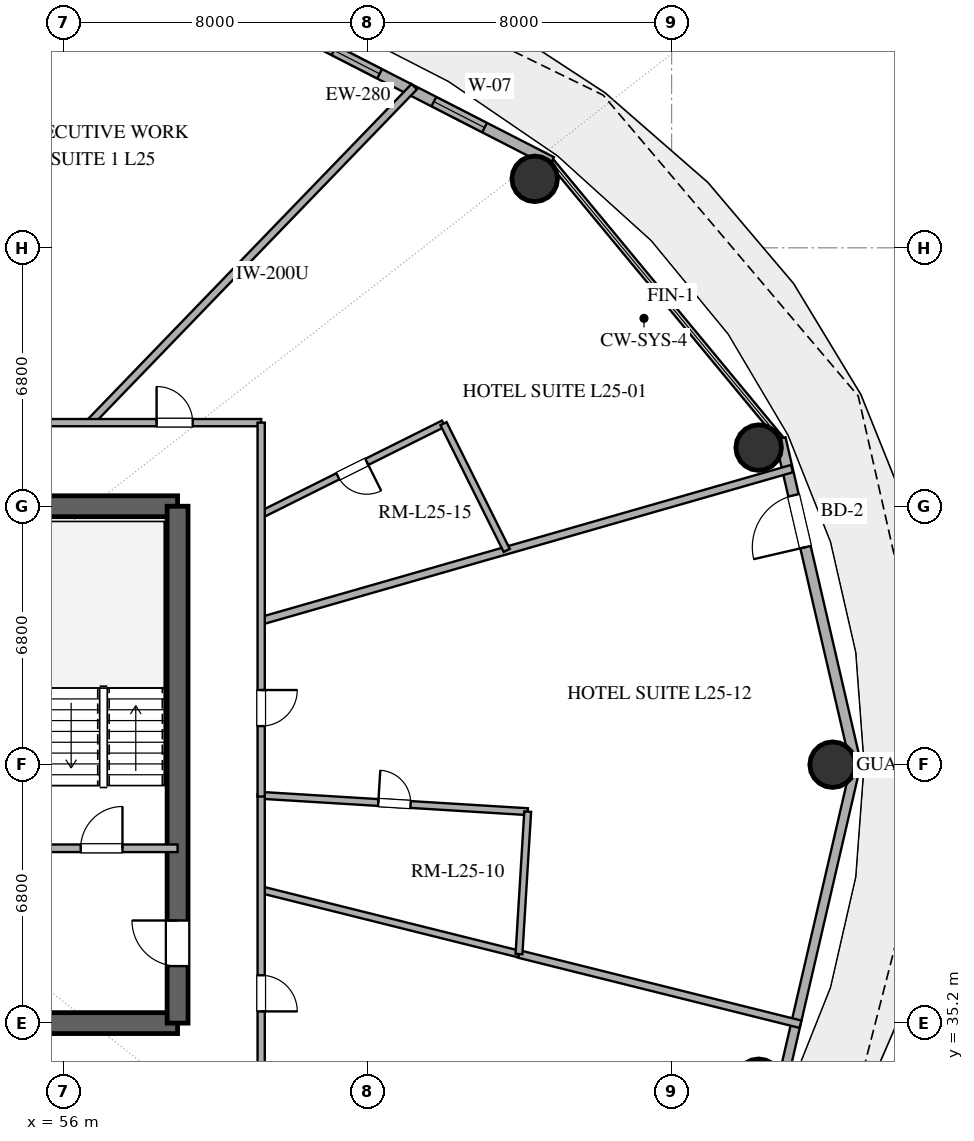
"""IFC4 building model, lengths in metres.
Left out: names, types, materials, properties, quantities, classifications, styles, units other than length and angle.
Written with IfcOpenShell. Run it as: python <this file> out.ifc"""

import sys

from ifc_helpers import new_model, si_unit, direction, frame, frame_2d, origin, origin_2d, place, context, subcontext, project, spatial, rectangle, hollow_circle, extrude, element, fill, save


model = new_model("IFC4")
c1 = context("Model", 3, precision=1e-05, world=origin(), true_north=direction((0.0, 1.0)))
c2 = subcontext(c1, "Body", "Model", "MODEL_VIEW")
j1 = project(units=[si_unit("LENGTHUNIT", "METRE"), si_unit("PLANEANGLEUNIT", "RADIAN")], contexts=[c1])
p1 = place(None, origin())
s1 = spatial("IfcSite", under=j1, at=p1, CompositionType="ELEMENT")
p2 = place(p1, origin())
s2 = spatial("IfcBuilding", under=s1, at=p2, CompositionType="ELEMENT")
p3 = place(p2, frame((0.0, 0.0, 102.0)))
s3 = spatial("IfcBuildingStorey", under=s2, at=p3, CompositionType="ELEMENT", Elevation=102.0)
for number, where, z_axis, x_axis in (
    (1, (55.0, 35.2, 0.0), (0.0, 0.0, 1.0), (1.0, 0.0, 0.0)),
    (2, (55.0, 48.8, 0.0), (0.0, 0.0, 1.0), (1.0, 0.0, 0.0)),
):
    element("IfcWall", number, at=place(p3, frame(where, z_axis=z_axis, x_axis=x_axis)), inside=s3, PredefinedType="SHEAR", context=c2, shape_type="SweptSolid", body=[
        extrude(rectangle(XDim=4.0, YDim=0.55, at=frame_2d((2.0, 0.0))), origin(), (0.0, 0.0, 1.0), 3.38),
    ])
p4 = place(p3, frame((59.0, 35.2, 0.0), z_axis=(0.0, 0.0, 1.0), x_axis=(0.0, 1.0, 0.0)))
e3 = element("IfcWall", 3, at=p4, inside=s3, PredefinedType="SHEAR", context=c2, shape_type="SweptSolid", body=[
    extrude(rectangle(XDim=13.6, YDim=0.55, at=frame_2d((6.8, 0.0))), origin(), (0.0, 0.0, 1.0), 3.38),
])
p5 = place(p4, frame((1.5, 0.0, 0.0)))
e4 = element("IfcOpeningElement", 4, at=p5, cuts=e3, PredefinedType="OPENING", context=c2, shape_type="SweptSolid", body=[
    extrude(rectangle(XDim=1.2, YDim=2.15, at=frame_2d((0.6, 1.075))), frame((0.0, 0.285, 0.0), z_axis=(0.0, -1.0, 0.0), x_axis=(1.0, 0.0, 0.0)), (0.0, 0.0, 1.0), 0.57),
])
for number, where, z_axis, x_axis in (
    (5, (76.237, 42.0, 0.0), (0.0, 0.0, 1.0), (1.0, 0.0, 0.0)),
    (6, (74.291, 50.343, 0.0), (0.0, 0.0, 1.0), (1.0, 0.0, 0.0)),
    (7, (68.398, 57.415, 0.0), (0.0, 0.0, 1.0), (1.0, 0.0, 0.0)),
    (8, (74.291, 33.657, 0.0), (0.0, 0.0, 1.0), (1.0, 0.0, 0.0)),
):
    element("IfcColumn", number, at=place(p3, frame(where, z_axis=z_axis, x_axis=x_axis)), inside=s3, PredefinedType="COLUMN", context=c2, shape_type="SweptSolid", body=[
        extrude(hollow_circle(Radius=0.6, WallThickness=0.032, at=origin_2d()), origin(), (0.0, 0.0, 1.0), 3.38),
    ])
p6 = place(p3, frame((76.849, 42.0, 0.0), z_axis=(0.0, 0.0, 1.0), x_axis=(-0.22558597182, 0.974223264616, 0.0)))
e9 = element("IfcWall", 9, at=p6, inside=s3, PredefinedType="SOLIDWALL", context=c2, shape_type="SweptSolid", body=[
    extrude(rectangle(XDim=8.811, YDim=0.28, at=frame_2d((4.405, 0.0))), origin(), (0.0, 0.0, 1.0), 3.38),
])
p7 = place(p6, frame((5.875, 0.0, 0.0)))
e10 = element("IfcOpeningElement", 10, at=p7, cuts=e9, PredefinedType="OPENING", context=c2, shape_type="SweptSolid", body=[
    extrude(rectangle(XDim=1.4, YDim=2.2, at=frame_2d((0.7, 1.1))), frame((0.0, 0.15, 0.0), z_axis=(0.0, -1.0, 0.0), x_axis=(1.0, 0.0, 0.0)), (0.0, 0.0, 1.0), 0.3),
])
p8 = place(p3, frame((68.84, 57.86, 0.0), z_axis=(0.0, 0.0, 1.0), x_axis=(-0.889959505023, 0.45603955905, 0.0)))
e11 = element("IfcWall", 11, at=p8, inside=s3, PredefinedType="SOLIDWALL", context=c2, shape_type="SweptSolid", body=[
    extrude(rectangle(XDim=10.662, YDim=0.28, at=frame_2d((5.331, 0.0))), origin(), (0.0, 0.0, 1.0), 3.38),
])
p9 = place(p8, frame((1.979, 0.0, 0.85)))
e12 = element("IfcOpeningElement", 12, at=p9, cuts=e11, PredefinedType="OPENING", context=c2, shape_type="SweptSolid", body=[
    extrude(rectangle(XDim=1.5, YDim=1.8, at=frame_2d((0.75, 0.9))), frame((0.0, 0.15, 0.0), z_axis=(0.0, -1.0, 0.0), x_axis=(1.0, 0.0, 0.0)), (0.0, 0.0, 1.0), 0.3),
])
p10 = place(p8, frame((5.082, 0.0, 0.85)))
e13 = element("IfcOpeningElement", 13, at=p10, cuts=e11, PredefinedType="OPENING", context=c2, shape_type="SweptSolid", body=[
    extrude(rectangle(XDim=1.35, YDim=1.8, at=frame_2d((0.675, 0.9))), frame((0.0, 0.15, 0.0), z_axis=(0.0, -1.0, 0.0), x_axis=(1.0, 0.0, 0.0)), (0.0, 0.0, 1.0), 0.3),
])
p11 = place(p8, frame((7.146, 0.0, 0.85)))
e14 = element("IfcOpeningElement", 14, at=p11, cuts=e11, PredefinedType="OPENING", context=c2, shape_type="SweptSolid", body=[
    extrude(rectangle(XDim=1.35, YDim=1.8, at=frame_2d((0.675, 0.9))), frame((0.0, 0.15, 0.0), z_axis=(0.0, -1.0, 0.0), x_axis=(1.0, 0.0, 0.0)), (0.0, 0.0, 1.0), 0.3),
])
p12 = place(p3, frame((74.861, 33.417, 0.0), z_axis=(0.0, 0.0, 1.0), x_axis=(0.22558597182, 0.974223264616, 0.0)))
e15 = element("IfcWall", 15, at=p12, inside=s3, PredefinedType="SOLIDWALL", context=c2, shape_type="SweptSolid", body=[
    extrude(rectangle(XDim=8.811, YDim=0.25, at=frame_2d((4.405, 0.0))), origin(), (0.0, 0.0, 1.0), 3.38),
])
p13 = place(p3, frame((55.0, 39.8, 0.0), z_axis=(0.0, 0.0, 1.0), x_axis=(1.0, 0.0, 0.0)))
e16 = element("IfcWall", 16, at=p13, inside=s3, PredefinedType="SOLIDWALL", context=c2, shape_type="SweptSolid", body=[
    extrude(rectangle(XDim=4.0, YDim=0.2, at=frame_2d((2.0, 0.0))), origin(), (0.0, 0.0, 1.0), 2.74),
])
p14 = place(p13, frame((1.45, 0.0, 0.0)))
e17 = element("IfcOpeningElement", 17, at=p14, cuts=e16, PredefinedType="OPENING", context=c2, shape_type="SweptSolid", body=[
    extrude(rectangle(XDim=1.1, YDim=2.15, at=frame_2d((0.55, 1.075))), frame((0.0, 0.11, 0.0), z_axis=(0.0, -1.0, 0.0), x_axis=(1.0, 0.0, 0.0)), (0.0, 0.0, 1.0), 0.22),
])
p15 = place(p3, frame((65.228, 59.84, 0.0), z_axis=(0.0, 0.0, 1.0), x_axis=(-0.694672506389, -0.719326149161, 0.0)))
e18 = element("IfcWall", 18, at=p15, inside=s3, PredefinedType="PARTITIONING", context=c2, shape_type="SweptSolid", body=[
    extrude(rectangle(XDim=12.289, YDim=0.2, at=frame_2d((6.145, 0.0))), origin(), (0.0, 0.0, 1.0), 2.74),
])
p16 = place(p3, frame((61.2, 45.785, 0.0), z_axis=(0.0, 0.0, 1.0), x_axis=(0.961261030421, 0.275639676741, 0.0)))
e19 = element("IfcWall", 19, at=p16, inside=s3, PredefinedType="PARTITIONING", context=c2, shape_type="SweptSolid", body=[
    extrude(rectangle(XDim=14.531, YDim=0.2, at=frame_2d((7.266, 0.0))), origin(), (0.0, 0.0, 1.0), 2.74),
])
p17 = place(p3, frame((75.391, 35.171, 0.0), z_axis=(0.0, 0.0, 1.0), x_axis=(-0.970302209845, 0.241895889938, 0.0)))
e20 = element("IfcWall", 20, at=p17, inside=s3, PredefinedType="PARTITIONING", context=c2, shape_type="SweptSolid", body=[
    extrude(rectangle(XDim=7.633, YDim=0.2, at=frame_2d((3.817, 0.0))), origin(), (0.0, 0.0, 1.0), 2.74),
])
p18 = place(p3, frame((61.2, 41.193, 0.0), z_axis=(0.0, 0.0, 1.0), x_axis=(0.998134708281, -0.061050013314, 0.0)))
e21 = element("IfcWall", 21, at=p18, inside=s3, PredefinedType="PLUMBINGWALL", context=c2, shape_type="SweptSolid", body=[
    extrude(rectangle(XDim=7.026, YDim=0.18, at=frame_2d((3.513, 0.0))), origin(), (0.0, 0.0, 1.0), 2.74),
])
p19 = place(p18, frame((3.088, 0.0, 0.0)))
e22 = element("IfcOpeningElement", 22, at=p19, cuts=e21, PredefinedType="OPENING", context=c2, shape_type="SweptSolid", body=[
    extrude(rectangle(XDim=0.85, YDim=2.1, at=frame_2d((0.425, 1.05))), frame((0.0, 0.1, 0.0), z_axis=(0.0, -1.0, 0.0), x_axis=(1.0, 0.0, 0.0)), (0.0, 0.0, 1.0), 0.2),
])
p20 = place(p3, frame((67.984, 37.017, 0.0), z_axis=(0.0, 0.0, 1.0), x_axis=(-0.970290206094, 0.241944034764, 0.0)))
e23 = element("IfcWall", 23, at=p20, inside=s3, PredefinedType="PLUMBINGWALL", context=c2, shape_type="SweptSolid", body=[
    extrude(rectangle(XDim=6.992, YDim=0.18, at=frame_2d((3.496, 0.0))), origin(), (0.0, 0.0, 1.0), 2.74),
])
p21 = place(p3, frame((48.518, 51.0, 0.0), z_axis=(0.0, 0.0, 1.0), x_axis=(1.0, 0.0, 0.0)))
e24 = element("IfcWall", 24, at=p21, inside=s3, PredefinedType="PARTITIONING", context=c2, shape_type="SweptSolid", body=[
    extrude(rectangle(XDim=12.682, YDim=0.19, at=frame_2d((6.341, 0.0))), origin(), (0.0, 0.0, 1.0), 2.74),
])
p22 = place(p21, frame((4.455, 0.0, 0.0)))
e25 = element("IfcOpeningElement", 25, at=p22, cuts=e24, PredefinedType="OPENING", context=c2, shape_type="SweptSolid", body=[
    extrude(rectangle(XDim=1.0, YDim=2.2, at=frame_2d((0.5, 1.1))), frame((0.0, 0.105, 0.0), z_axis=(0.0, -1.0, 0.0), x_axis=(1.0, 0.0, 0.0)), (0.0, 0.0, 1.0), 0.21),
])
p23 = place(p21, frame((9.93, 0.0, 0.0)))
e26 = element("IfcOpeningElement", 26, at=p23, cuts=e24, PredefinedType="OPENING", context=c2, shape_type="SweptSolid", body=[
    extrude(rectangle(XDim=0.95, YDim=2.15, at=frame_2d((0.475, 1.075))), frame((0.0, 0.105, 0.0), z_axis=(0.0, -1.0, 0.0), x_axis=(1.0, 0.0, 0.0)), (0.0, 0.0, 1.0), 0.21),
])
p24 = place(p3, frame((61.2, 41.225, 0.0), z_axis=(0.0, 0.0, 1.0), x_axis=(0.0, -1.0, 0.0)))
e27 = element("IfcWall", 27, at=p24, inside=s3, PredefinedType="PARTITIONING", context=c2, shape_type="SweptSolid", body=[
    extrude(rectangle(XDim=8.225, YDim=0.19, at=frame_2d((4.112, 0.0))), origin(), (0.0, 0.0, 1.0), 2.74),
])
p25 = place(p24, frame((4.767, 0.0, 0.0)))
e28 = element("IfcOpeningElement", 28, at=p25, cuts=e27, PredefinedType="OPENING", context=c2, shape_type="SweptSolid", body=[
    extrude(rectangle(XDim=0.95, YDim=2.15, at=frame_2d((0.475, 1.075))), frame((0.0, 0.105, 0.0), z_axis=(0.0, -1.0, 0.0), x_axis=(1.0, 0.0, 0.0)), (0.0, 0.0, 1.0), 0.21),
])
p26 = place(p3, frame((65.998, 50.973, 0.0), z_axis=(0.0, 0.0, 1.0), x_axis=(-0.894936648514, -0.446193226244, 0.0)))
e29 = element("IfcWall", 29, at=p26, inside=s3, PredefinedType="PLUMBINGWALL", context=c2, shape_type="SweptSolid", body=[
    extrude(rectangle(XDim=5.361, YDim=0.18, at=frame_2d((2.681, 0.0))), origin(), (0.0, 0.0, 1.0), 2.74),
])
p27 = place(p26, frame((2.256, 0.0, 0.0)))
e30 = element("IfcOpeningElement", 30, at=p27, cuts=e29, PredefinedType="OPENING", context=c2, shape_type="SweptSolid", body=[
    extrude(rectangle(XDim=0.85, YDim=2.1, at=frame_2d((0.425, 1.05))), frame((0.0, 0.1, 0.0), z_axis=(0.0, -1.0, 0.0), x_axis=(1.0, 0.0, 0.0)), (0.0, 0.0, 1.0), 0.2),
])
p28 = place(p3, frame((61.2, 51.0, 0.0), z_axis=(0.0, 0.0, 1.0), x_axis=(0.0, -1.0, 0.0)))
e31 = element("IfcWall", 31, at=p28, inside=s3, PredefinedType="PARTITIONING", context=c2, shape_type="SweptSolid", body=[
    extrude(rectangle(XDim=9.839, YDim=0.19, at=frame_2d((4.92, 0.0))), origin(), (0.0, 0.0, 1.0), 2.74),
])
p29 = place(p28, frame((7.035, 0.0, 0.0)))
e32 = element("IfcOpeningElement", 32, at=p29, cuts=e31, PredefinedType="OPENING", context=c2, shape_type="SweptSolid", body=[
    extrude(rectangle(XDim=0.95, YDim=2.15, at=frame_2d((0.475, 1.075))), frame((0.0, 0.105, 0.0), z_axis=(0.0, -1.0, 0.0), x_axis=(1.0, 0.0, 0.0)), (0.0, 0.0, 1.0), 0.21),
])
p30 = place(p3, frame((68.213, 40.764, 0.0), z_axis=(0.0, 0.0, 1.0), x_axis=(-0.061013519028, -0.998136939751, 0.0)))
e33 = element("IfcWall", 33, at=p30, inside=s3, PredefinedType="PLUMBINGWALL", context=c2, shape_type="SweptSolid", body=[
    extrude(rectangle(XDim=3.753, YDim=0.18, at=frame_2d((1.877, 0.0))), origin(), (0.0, 0.0, 1.0), 2.74),
])
p31 = place(p3, frame((67.661, 47.638, 0.0), z_axis=(0.0, 0.0, 1.0), x_axis=(-0.446243949247, 0.894911357488, 0.0)))
e34 = element("IfcWall", 34, at=p31, inside=s3, PredefinedType="PLUMBINGWALL", context=c2, shape_type="SweptSolid", body=[
    extrude(rectangle(XDim=3.727, YDim=0.18, at=frame_2d((1.864, 0.0))), origin(), (0.0, 0.0, 1.0), 2.74),
])
p32 = place(p7, origin())
e35 = element("IfcDoor", 35, at=p32, inside=s3, OperationType="SINGLE_SWING_LEFT", PredefinedType="DOOR", context=c2, shape_type="SweptSolid", body=[
    extrude(rectangle(XDim=1.4, YDim=2.2, at=frame_2d((0.7, 1.1))), frame((0.0, 0.025, 0.0), z_axis=(0.0, -1.0, 0.0), x_axis=(1.0, 0.0, 0.0)), (0.0, 0.0, 1.0), 0.05),
])
fill(e10, e35)
p33 = place(p9, origin())
e36 = element("IfcWindow", 36, at=p33, inside=s3, PartitioningType="SINGLE_PANEL", PredefinedType="WINDOW", context=c2, shape_type="SweptSolid", body=[
    extrude(rectangle(XDim=1.5, YDim=1.8, at=frame_2d((0.75, 0.9))), frame((0.0, 0.03, 0.0), z_axis=(0.0, -1.0, 0.0), x_axis=(1.0, 0.0, 0.0)), (0.0, 0.0, 1.0), 0.06),
])
fill(e12, e36)
p34 = place(p10, origin())
e37 = element("IfcWindow", 37, at=p34, inside=s3, PartitioningType="SINGLE_PANEL", PredefinedType="WINDOW", context=c2, shape_type="SweptSolid", body=[
    extrude(rectangle(XDim=1.35, YDim=1.8, at=frame_2d((0.675, 0.9))), frame((0.0, 0.03, 0.0), z_axis=(0.0, -1.0, 0.0), x_axis=(1.0, 0.0, 0.0)), (0.0, 0.0, 1.0), 0.06),
])
fill(e13, e37)
p35 = place(p5, origin())
e38 = element("IfcDoor", 38, at=p35, inside=s3, OperationType="SINGLE_SWING_RIGHT", PredefinedType="DOOR", context=c2, shape_type="SweptSolid", body=[
    extrude(rectangle(XDim=1.2, YDim=2.15, at=frame_2d((0.6, 1.075))), frame((0.0, 0.025, 0.0), z_axis=(0.0, -1.0, 0.0), x_axis=(1.0, 0.0, 0.0)), (0.0, 0.0, 1.0), 0.05),
])
fill(e4, e38)
p36 = place(p14, origin())
e39 = element("IfcDoor", 39, at=p36, inside=s3, OperationType="SINGLE_SWING_RIGHT", PredefinedType="DOOR", context=c2, shape_type="SweptSolid", body=[
    extrude(rectangle(XDim=1.1, YDim=2.15, at=frame_2d((0.55, 1.075))), frame((0.0, 0.025, 0.0), z_axis=(0.0, -1.0, 0.0), x_axis=(1.0, 0.0, 0.0)), (0.0, 0.0, 1.0), 0.05),
])
fill(e17, e39)
p37 = place(p19, origin())
e40 = element("IfcDoor", 40, at=p37, inside=s3, OperationType="SINGLE_SWING_LEFT", PredefinedType="DOOR", context=c2, shape_type="SweptSolid", body=[
    extrude(rectangle(XDim=0.85, YDim=2.1, at=frame_2d((0.425, 1.05))), frame((0.0, 0.025, 0.0), z_axis=(0.0, -1.0, 0.0), x_axis=(1.0, 0.0, 0.0)), (0.0, 0.0, 1.0), 0.05),
])
fill(e22, e40)
p38 = place(p23, origin())
e41 = element("IfcDoor", 41, at=p38, inside=s3, OperationType="SINGLE_SWING_LEFT", PredefinedType="DOOR", context=c2, shape_type="SweptSolid", body=[
    extrude(rectangle(XDim=0.95, YDim=2.15, at=frame_2d((0.475, 1.075))), frame((0.0, 0.025, 0.0), z_axis=(0.0, -1.0, 0.0), x_axis=(1.0, 0.0, 0.0)), (0.0, 0.0, 1.0), 0.05),
])
fill(e26, e41)
p39 = place(p25, origin())
e42 = element("IfcDoor", 42, at=p39, inside=s3, OperationType="SINGLE_SWING_RIGHT", PredefinedType="DOOR", context=c2, shape_type="SweptSolid", body=[
    extrude(rectangle(XDim=0.95, YDim=2.15, at=frame_2d((0.475, 1.075))), frame((0.0, 0.025, 0.0), z_axis=(0.0, -1.0, 0.0), x_axis=(1.0, 0.0, 0.0)), (0.0, 0.0, 1.0), 0.05),
])
fill(e28, e42)
p40 = place(p27, origin())
e43 = element("IfcDoor", 43, at=p40, inside=s3, OperationType="SINGLE_SWING_LEFT", PredefinedType="DOOR", context=c2, shape_type="SweptSolid", body=[
    extrude(rectangle(XDim=0.85, YDim=2.1, at=frame_2d((0.425, 1.05))), frame((0.0, 0.025, 0.0), z_axis=(0.0, -1.0, 0.0), x_axis=(1.0, 0.0, 0.0)), (0.0, 0.0, 1.0), 0.05),
])
fill(e30, e43)
p41 = place(p29, origin())
e44 = element("IfcDoor", 44, at=p41, inside=s3, OperationType="SINGLE_SWING_LEFT", PredefinedType="DOOR", context=c2, shape_type="SweptSolid", body=[
    extrude(rectangle(XDim=0.95, YDim=2.15, at=frame_2d((0.475, 1.075))), frame((0.0, 0.025, 0.0), z_axis=(0.0, -1.0, 0.0), x_axis=(1.0, 0.0, 0.0)), (0.0, 0.0, 1.0), 0.05),
])
fill(e32, e44)
save(model, sys.argv[1])
